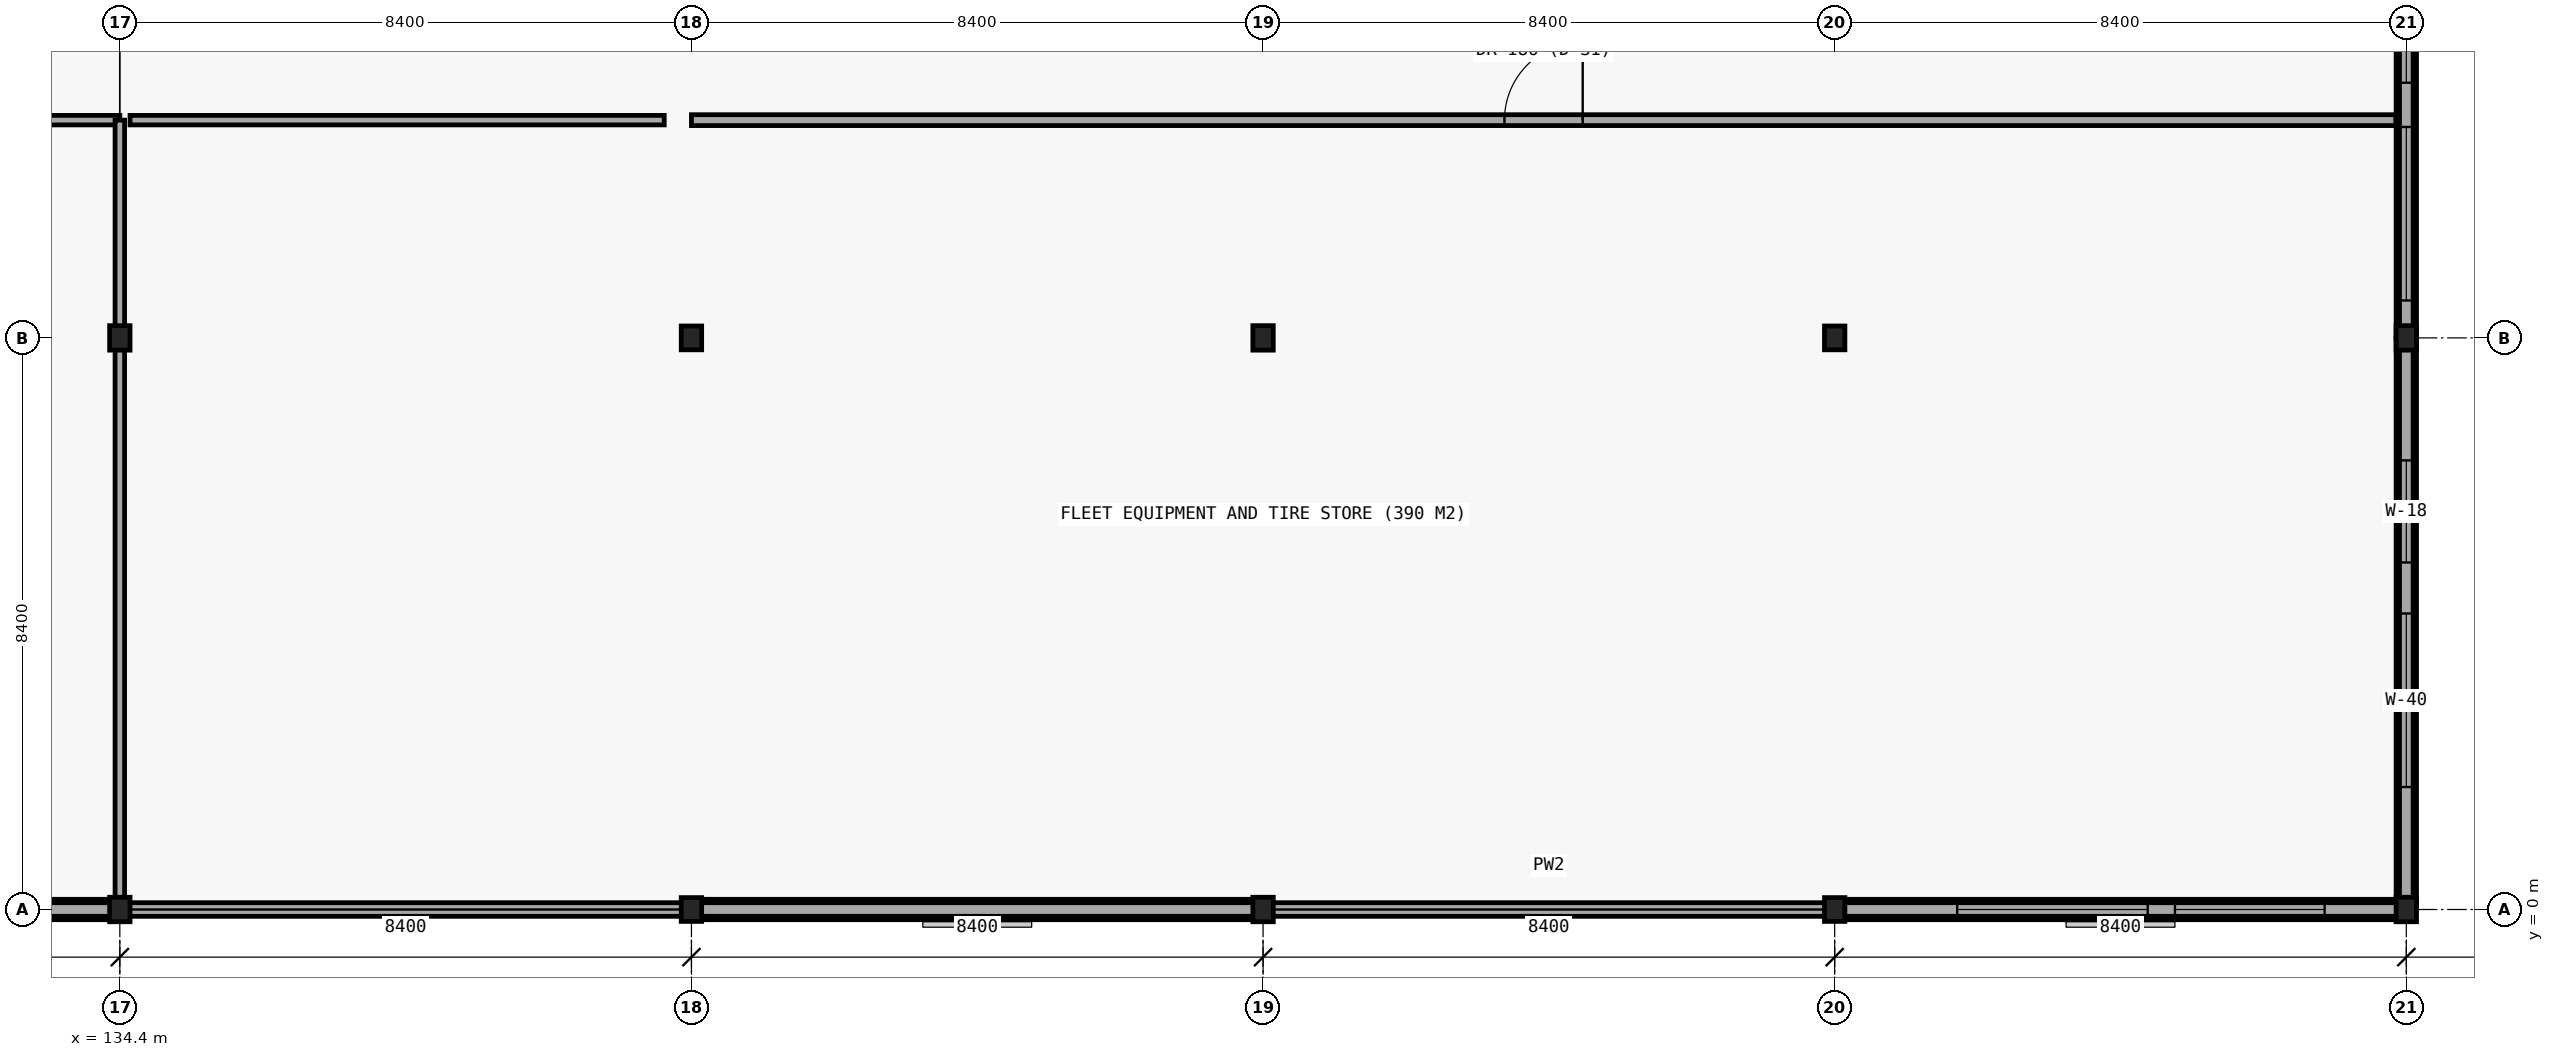
"""IFC4 building model, lengths in metres.
Left out: names, types, materials, properties, quantities, classifications, styles, units other than length and angle.
Written with IfcOpenShell. Run it as: python <this file> out.ifc"""

import sys

from ifc_helpers import new_model, si_unit, direction, frame, frame_2d, origin, origin_2d, place, context, subcontext, project, spatial, rectangle, i_section, extrude, element, fill, save


model = new_model("IFC4")
c1 = context("Model", 3, precision=1e-05, world=origin(), true_north=direction((0.0, 1.0)))
c2 = subcontext(c1, "Body", "Model", "MODEL_VIEW")
j1 = project(units=[si_unit("LENGTHUNIT", "METRE"), si_unit("PLANEANGLEUNIT", "RADIAN")], contexts=[c1])
p1 = place(None, origin())
s1 = spatial("IfcSite", under=j1, at=p1, CompositionType="ELEMENT")
p2 = place(p1, origin())
s2 = spatial("IfcBuilding", under=s1, at=p2, CompositionType="ELEMENT")
p3 = place(p2, frame((0.0, 0.0, 9.0)))
s3 = spatial("IfcBuildingStorey", under=s2, at=p3, CompositionType="ELEMENT", Elevation=9.0)
for number, where, z_axis, x_axis in (
    (1, (134.4, 0.0, 0.0), (0.0, 0.0, 1.0), (1.0, 0.0, 0.0)),
    (2, (134.4, 8.4, 0.0), (0.0, 0.0, 1.0), (1.0, 0.0, 0.0)),
):
    element("IfcColumn", number, at=place(p3, frame(where, z_axis=z_axis, x_axis=x_axis)), inside=s3, PredefinedType="COLUMN", context=c2, shape_type="SweptSolid", body=[
        extrude(i_section(OverallWidth=0.3, OverallDepth=0.36, WebThickness=0.012, FlangeThickness=0.022, FilletRadius=0.027, at=origin_2d()), origin(), (0.0, 0.0, 1.0), 4.03),
    ])
for number, where, z_axis, x_axis in (
    (3, (142.8, 0.0, 0.0), (0.0, 0.0, 1.0), (1.0, 0.0, 0.0)),
    (4, (142.8, 8.4, 0.0), (0.0, 0.0, 1.0), (1.0, 0.0, 0.0)),
):
    element("IfcColumn", number, at=place(p3, frame(where, z_axis=z_axis, x_axis=x_axis)), inside=s3, PredefinedType="COLUMN", context=c2, shape_type="SweptSolid", body=[
        extrude(i_section(OverallWidth=0.3, OverallDepth=0.35, WebThickness=0.01, FlangeThickness=0.018, FilletRadius=0.027, at=origin_2d()), origin(), (0.0, 0.0, 1.0), 4.03),
    ])
for number, where, z_axis, x_axis in (
    (5, (151.2, 0.0, 0.0), (0.0, 0.0, 1.0), (1.0, 0.0, 0.0)),
    (6, (151.2, 8.4, 0.0), (0.0, 0.0, 1.0), (1.0, 0.0, 0.0)),
):
    element("IfcColumn", number, at=place(p3, frame(where, z_axis=z_axis, x_axis=x_axis)), inside=s3, PredefinedType="COLUMN", context=c2, shape_type="SweptSolid", body=[
        extrude(i_section(OverallWidth=0.3, OverallDepth=0.36, WebThickness=0.012, FlangeThickness=0.022, FilletRadius=0.027, at=origin_2d()), origin(), (0.0, 0.0, 1.0), 4.03),
    ])
for number, where, z_axis, x_axis in (
    (7, (159.6, 0.0, 0.0), (0.0, 0.0, 1.0), (1.0, 0.0, 0.0)),
    (8, (159.6, 8.4, 0.0), (0.0, 0.0, 1.0), (1.0, 0.0, 0.0)),
):
    element("IfcColumn", number, at=place(p3, frame(where, z_axis=z_axis, x_axis=x_axis)), inside=s3, PredefinedType="COLUMN", context=c2, shape_type="SweptSolid", body=[
        extrude(i_section(OverallWidth=0.3, OverallDepth=0.35, WebThickness=0.01, FlangeThickness=0.018, FilletRadius=0.027, at=origin_2d()), origin(), (0.0, 0.0, 1.0), 4.03),
    ])
for number, where, z_axis, x_axis in (
    (9, (168.0, 0.0, 0.0), (0.0, 0.0, 1.0), (1.0, 0.0, 0.0)),
    (10, (168.0, 8.4, 0.0), (0.0, 0.0, 1.0), (1.0, 0.0, 0.0)),
):
    element("IfcColumn", number, at=place(p3, frame(where, z_axis=z_axis, x_axis=x_axis)), inside=s3, PredefinedType="COLUMN", context=c2, shape_type="SweptSolid", body=[
        extrude(i_section(OverallWidth=0.3, OverallDepth=0.36, WebThickness=0.012, FlangeThickness=0.022, FilletRadius=0.027, at=origin_2d()), origin(), (0.0, 0.0, 1.0), 4.03),
    ])
p4 = place(p3, frame((126.0, 0.0, 0.0), z_axis=(0.0, 0.0, 1.0), x_axis=(1.0, 0.0, 0.0)))
e11 = element("IfcWall", 11, at=p4, inside=s3, PredefinedType="STANDARD", context=c2, shape_type="SweptSolid", body=[
    extrude(rectangle(XDim=8.4, YDim=0.3, at=frame_2d((4.2, 0.0))), origin(), (0.0, 0.0, 1.0), 3.58),
])
p5 = place(p4, frame((1.8, 0.0, 1.05)))
e12 = element("IfcOpeningElement", 12, at=p5, cuts=e11, PredefinedType="OPENING", context=c2, shape_type="SweptSolid", body=[
    extrude(rectangle(XDim=2.8, YDim=1.2, at=frame_2d((1.4, 0.6))), frame((0.0, 0.16, 0.0), z_axis=(0.0, -1.0, 0.0), x_axis=(1.0, 0.0, 0.0)), (0.0, 0.0, 1.0), 0.32),
])
p6 = place(p4, frame((5.0, 0.0, 1.15)))
e13 = element("IfcOpeningElement", 13, at=p6, cuts=e11, PredefinedType="OPENING", context=c2, shape_type="SweptSolid", body=[
    extrude(rectangle(XDim=2.2, YDim=1.1, at=frame_2d((1.1, 0.55))), frame((0.0, 0.16, 0.0), z_axis=(0.0, -1.0, 0.0), x_axis=(1.0, 0.0, 0.0)), (0.0, 0.0, 1.0), 0.32),
])
p7 = place(p3, frame((142.8, 0.0, 0.0), z_axis=(0.0, 0.0, 1.0), x_axis=(1.0, 0.0, 0.0)))
e14 = element("IfcWall", 14, at=p7, inside=s3, PredefinedType="STANDARD", context=c2, shape_type="SweptSolid", body=[
    extrude(rectangle(XDim=8.4, YDim=0.3, at=frame_2d((4.2, 0.0))), origin(), (0.0, 0.0, 1.0), 3.58),
])
p8 = place(p3, frame((159.6, 0.0, 0.0), z_axis=(0.0, 0.0, 1.0), x_axis=(1.0, 0.0, 0.0)))
e15 = element("IfcWall", 15, at=p8, inside=s3, PredefinedType="STANDARD", context=c2, shape_type="SweptSolid", body=[
    extrude(rectangle(XDim=8.4, YDim=0.3, at=frame_2d((4.2, 0.0))), origin(), (0.0, 0.0, 1.0), 3.58),
])
p9 = place(p8, frame((1.8, 0.0, 1.05)))
e16 = element("IfcOpeningElement", 16, at=p9, cuts=e15, PredefinedType="OPENING", context=c2, shape_type="SweptSolid", body=[
    extrude(rectangle(XDim=2.8, YDim=1.2, at=frame_2d((1.4, 0.6))), frame((0.0, 0.16, 0.0), z_axis=(0.0, -1.0, 0.0), x_axis=(1.0, 0.0, 0.0)), (0.0, 0.0, 1.0), 0.32),
])
p10 = place(p8, frame((5.0, 0.0, 1.15)))
e17 = element("IfcOpeningElement", 17, at=p10, cuts=e15, PredefinedType="OPENING", context=c2, shape_type="SweptSolid", body=[
    extrude(rectangle(XDim=2.2, YDim=1.1, at=frame_2d((1.1, 0.55))), frame((0.0, 0.16, 0.0), z_axis=(0.0, -1.0, 0.0), x_axis=(1.0, 0.0, 0.0)), (0.0, 0.0, 1.0), 0.32),
])
p11 = place(p3, frame((168.0, 0.0, 0.0), z_axis=(0.0, 0.0, 1.0), x_axis=(0.0, 1.0, 0.0)))
e18 = element("IfcWall", 18, at=p11, inside=s3, PredefinedType="STANDARD", context=c2, shape_type="SweptSolid", body=[
    extrude(rectangle(XDim=8.4, YDim=0.3, at=frame_2d((4.2, 0.0))), origin(), (0.0, 0.0, 1.0), 3.58),
])
p12 = place(p11, frame((1.8, 0.0, 1.05)))
e19 = element("IfcOpeningElement", 19, at=p12, cuts=e18, PredefinedType="OPENING", context=c2, shape_type="SweptSolid", body=[
    extrude(rectangle(XDim=2.55, YDim=1.15, at=frame_2d((1.275, 0.575))), frame((0.0, 0.16, 0.0), z_axis=(0.0, -1.0, 0.0), x_axis=(1.0, 0.0, 0.0)), (0.0, 0.0, 1.0), 0.32),
])
p13 = place(p11, frame((5.1, 0.0, 1.2)))
e20 = element("IfcOpeningElement", 20, at=p13, cuts=e18, PredefinedType="OPENING", context=c2, shape_type="SweptSolid", body=[
    extrude(rectangle(XDim=1.5, YDim=1.7, at=frame_2d((0.75, 0.85))), frame((0.0, 0.16, 0.0), z_axis=(0.0, -1.0, 0.0), x_axis=(1.0, 0.0, 0.0)), (0.0, 0.0, 1.0), 0.32),
])
p14 = place(p3, frame((168.0, 8.4, 0.0), z_axis=(0.0, 0.0, 1.0), x_axis=(0.0, 1.0, 0.0)))
e21 = element("IfcWall", 21, at=p14, inside=s3, PredefinedType="STANDARD", context=c2, shape_type="SweptSolid", body=[
    extrude(rectangle(XDim=8.4, YDim=0.3, at=frame_2d((4.2, 0.0))), origin(), (0.0, 0.0, 1.0), 3.58),
])
p15 = place(p14, frame((0.55, 0.0, 1.05)))
e22 = element("IfcOpeningElement", 22, at=p15, cuts=e21, PredefinedType="OPENING", context=c2, shape_type="SweptSolid", body=[
    extrude(rectangle(XDim=2.55, YDim=1.15, at=frame_2d((1.275, 0.575))), frame((0.0, 0.16, 0.0), z_axis=(0.0, -1.0, 0.0), x_axis=(1.0, 0.0, 0.0)), (0.0, 0.0, 1.0), 0.32),
])
p16 = place(p14, frame((3.75, 0.0, 1.2)))
e23 = element("IfcOpeningElement", 23, at=p16, cuts=e21, PredefinedType="OPENING", context=c2, shape_type="SweptSolid", body=[
    extrude(rectangle(XDim=1.5, YDim=1.7, at=frame_2d((0.75, 0.85))), frame((0.0, 0.16, 0.0), z_axis=(0.0, -1.0, 0.0), x_axis=(1.0, 0.0, 0.0)), (0.0, 0.0, 1.0), 0.32),
])
p17 = place(p3, frame((142.8, 0.0, 4.2), z_axis=(0.0, 0.0, 1.0), x_axis=(1.0, 0.0, 0.0)))
e24 = element("IfcWall", 24, at=p17, inside=s3, PredefinedType="PARAPET", context=c2, shape_type="SweptSolid", body=[
    extrude(rectangle(XDim=25.2, YDim=0.2, at=frame_2d((12.6, 0.0))), origin(), (0.0, 0.0, 1.0), 0.95),
])
p18 = place(p3, frame((168.0, 0.0, 4.2), z_axis=(0.0, 0.0, 1.0), x_axis=(0.0, 1.0, 0.0)))
e25 = element("IfcWall", 25, at=p18, inside=s3, PredefinedType="PARAPET", context=c2, shape_type="SweptSolid", body=[
    extrude(rectangle(XDim=42.0, YDim=0.2, at=frame_2d((21.0, 0.0))), origin(), (0.0, 0.0, 1.0), 0.95),
])
p19 = place(p3, frame((109.2, 0.0, 4.2), z_axis=(0.0, 0.0, 1.0), x_axis=(1.0, 0.0, 0.0)))
e26 = element("IfcWall", 26, at=p19, inside=s3, PredefinedType="PARAPET", context=c2, shape_type="SweptSolid", body=[
    extrude(rectangle(XDim=33.6, YDim=0.2, at=frame_2d((16.8, 0.0))), origin(), (0.0, 0.0, 1.0), 0.95),
])
p20 = place(p3, frame((126.15, 11.6, 0.0), z_axis=(0.0, 0.0, 1.0), x_axis=(1.0, 0.0, 0.0)))
e27 = element("IfcWall", 27, at=p20, inside=s3, PredefinedType="PARTITIONING", context=c2, shape_type="SweptSolid", body=[
    extrude(rectangle(XDim=8.25, YDim=0.14, at=frame_2d((4.125, 0.0))), origin(), (0.0, 0.0, 1.0), 3.5),
])
p21 = place(p3, frame((134.55, 11.6, 0.0), z_axis=(0.0, 0.0, 1.0), x_axis=(1.0, 0.0, 0.0)))
e28 = element("IfcWall", 28, at=p21, inside=s3, PredefinedType="PARTITIONING", context=c2, shape_type="SweptSolid", body=[
    extrude(rectangle(XDim=7.85, YDim=0.14, at=frame_2d((3.925, 0.0))), origin(), (0.0, 0.0, 1.0), 3.5),
])
p22 = place(p3, frame((142.8, 11.6, 0.0), z_axis=(0.0, 0.0, 1.0), x_axis=(1.0, 0.0, 0.0)))
e29 = element("IfcWall", 29, at=p22, inside=s3, PredefinedType="PARTITIONING", context=c2, shape_type="SweptSolid", body=[
    extrude(rectangle(XDim=25.045, YDim=0.16, at=frame_2d((12.522, 0.0))), origin(), (0.0, 0.0, 1.0), 3.5),
])
p23 = place(p22, frame((11.947, 0.0, 0.0)))
e30 = element("IfcOpeningElement", 30, at=p23, cuts=e29, PredefinedType="OPENING", context=c2, shape_type="SweptSolid", body=[
    extrude(rectangle(XDim=1.15, YDim=2.15, at=frame_2d((0.575, 1.075))), frame((0.0, 0.09, 0.0), z_axis=(0.0, -1.0, 0.0), x_axis=(1.0, 0.0, 0.0)), (0.0, 0.0, 1.0), 0.18),
])
p24 = place(p3, frame((134.4, 0.155, 0.0), z_axis=(0.0, 0.0, 1.0), x_axis=(0.0, 1.0, 0.0)))
e31 = element("IfcWall", 31, at=p24, inside=s3, PredefinedType="PARTITIONING", context=c2, shape_type="SweptSolid", body=[
    extrude(rectangle(XDim=11.445, YDim=0.14, at=frame_2d((5.723, 0.0))), origin(), (0.0, 0.0, 1.0), 3.5),
])
p25 = place(p9, origin())
e32 = element("IfcWindow", 32, at=p25, inside=s3, PartitioningType="SINGLE_PANEL", PredefinedType="WINDOW", context=c2, shape_type="SweptSolid", body=[
    extrude(rectangle(XDim=2.8, YDim=1.2, at=frame_2d((1.4, 0.6))), frame((0.0, 0.03, 0.0), z_axis=(0.0, -1.0, 0.0), x_axis=(1.0, 0.0, 0.0)), (0.0, 0.0, 1.0), 0.06),
])
fill(e16, e32)
p26 = place(p10, origin())
e33 = element("IfcWindow", 33, at=p26, inside=s3, PartitioningType="SINGLE_PANEL", PredefinedType="WINDOW", context=c2, shape_type="SweptSolid", body=[
    extrude(rectangle(XDim=2.2, YDim=1.1, at=frame_2d((1.1, 0.55))), frame((0.0, 0.03, 0.0), z_axis=(0.0, -1.0, 0.0), x_axis=(1.0, 0.0, 0.0)), (0.0, 0.0, 1.0), 0.06),
])
fill(e17, e33)
p27 = place(p12, origin())
e34 = element("IfcWindow", 34, at=p27, inside=s3, PartitioningType="SINGLE_PANEL", PredefinedType="WINDOW", context=c2, shape_type="SweptSolid", body=[
    extrude(rectangle(XDim=2.55, YDim=1.15, at=frame_2d((1.275, 0.575))), frame((0.0, 0.03, 0.0), z_axis=(0.0, -1.0, 0.0), x_axis=(1.0, 0.0, 0.0)), (0.0, 0.0, 1.0), 0.06),
])
fill(e19, e34)
p28 = place(p13, origin())
e35 = element("IfcWindow", 35, at=p28, inside=s3, PartitioningType="SINGLE_PANEL", PredefinedType="WINDOW", context=c2, shape_type="SweptSolid", body=[
    extrude(rectangle(XDim=1.5, YDim=1.7, at=frame_2d((0.75, 0.85))), frame((0.0, 0.03, 0.0), z_axis=(0.0, -1.0, 0.0), x_axis=(1.0, 0.0, 0.0)), (0.0, 0.0, 1.0), 0.06),
])
fill(e20, e35)
p29 = place(p15, origin())
e36 = element("IfcWindow", 36, at=p29, inside=s3, PartitioningType="SINGLE_PANEL", PredefinedType="WINDOW", context=c2, shape_type="SweptSolid", body=[
    extrude(rectangle(XDim=2.55, YDim=1.15, at=frame_2d((1.275, 0.575))), frame((0.0, 0.03, 0.0), z_axis=(0.0, -1.0, 0.0), x_axis=(1.0, 0.0, 0.0)), (0.0, 0.0, 1.0), 0.06),
])
fill(e22, e36)
p30 = place(p16, origin())
e37 = element("IfcWindow", 37, at=p30, inside=s3, PartitioningType="SINGLE_PANEL", PredefinedType="WINDOW", context=c2, shape_type="SweptSolid", body=[
    extrude(rectangle(XDim=1.5, YDim=1.7, at=frame_2d((0.75, 0.85))), frame((0.0, 0.03, 0.0), z_axis=(0.0, -1.0, 0.0), x_axis=(1.0, 0.0, 0.0)), (0.0, 0.0, 1.0), 0.06),
])
fill(e23, e37)
p31 = place(p23, origin())
e38 = element("IfcDoor", 38, at=p31, inside=s3, OperationType="SINGLE_SWING_RIGHT", PredefinedType="DOOR", context=c2, shape_type="SweptSolid", body=[
    extrude(rectangle(XDim=1.15, YDim=2.15, at=frame_2d((0.575, 1.075))), frame((0.0, 0.025, 0.0), z_axis=(0.0, -1.0, 0.0), x_axis=(1.0, 0.0, 0.0)), (0.0, 0.0, 1.0), 0.05),
])
fill(e30, e38)
save(model, sys.argv[1])
